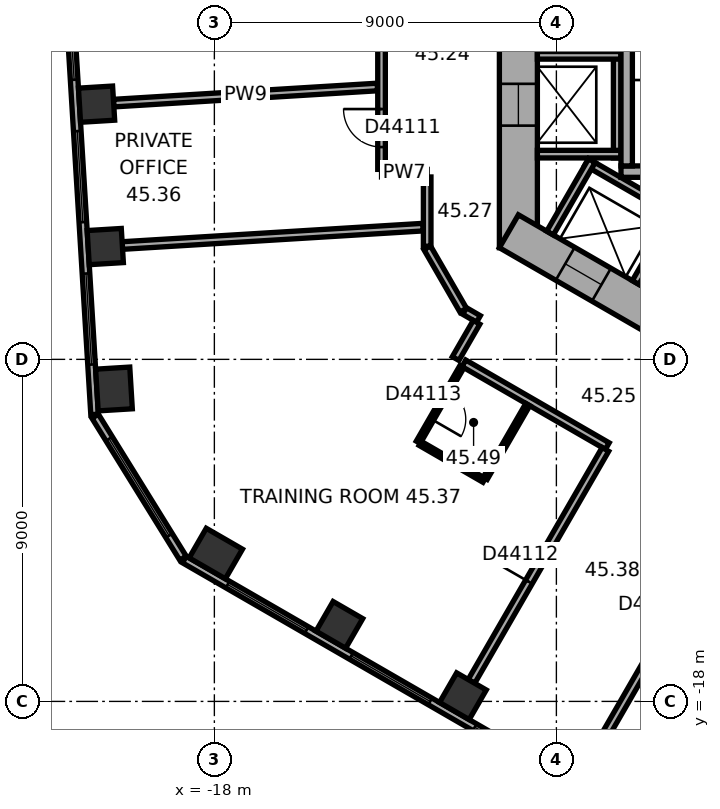
"""IFC4 building model, lengths in metres.
Left out: names, types, materials, properties, quantities, classifications, styles, units other than length and angle.
Written with IfcOpenShell. Run it as: python <this file> out.ifc"""

import sys

from ifc_helpers import new_model, si_unit, direction, frame, frame_2d, origin, origin_2d, place, context, subcontext, project, spatial, rectangle, extrude, element, fill, save


model = new_model("IFC4")
c1 = context("Model", 3, precision=1e-05, world=origin(), true_north=direction((0.0, 1.0)))
c2 = subcontext(c1, "Body", "Model", "MODEL_VIEW")
j1 = project(units=[si_unit("LENGTHUNIT", "METRE"), si_unit("PLANEANGLEUNIT", "RADIAN")], contexts=[c1])
p1 = place(None, origin())
s1 = spatial("IfcSite", under=j1, at=p1, CompositionType="ELEMENT")
p2 = place(p1, origin())
s2 = spatial("IfcBuilding", under=s1, at=p2, CompositionType="ELEMENT")
p3 = place(p2, frame((0.0, 0.0, 183.6)))
s3 = spatial("IfcBuildingStorey", under=s2, at=p3, CompositionType="ELEMENT", Elevation=183.6)
for number, where, z_axis, x_axis in (
    (1, (-21.1, -2.285, 0.0), (0.0, 0.0, 1.0), (0.061, -0.998, 0.0)),
    (2, (-20.871, -6.032, 0.0), (0.0, 0.0, 1.0), (0.061, -0.998, 0.0)),
):
    element("IfcColumn", number, at=place(p3, frame(where, z_axis=z_axis, x_axis=x_axis)), inside=s3, PredefinedType="COLUMN", context=c2, shape_type="SweptSolid", body=[
        extrude(rectangle(XDim=0.9, YDim=0.9, at=origin_2d()), origin(), (0.0, 0.0, 1.0), 3.7),
    ])
for number, where, z_axis, x_axis in (
    (3, (-20.642, -9.779, 0.0), (0.0, 0.0, 1.0), (0.061, -0.998, 0.0)),
    (4, (-17.962, -14.109, 0.0), (0.0, 0.0, 1.0), (0.866, -0.5, 0.0)),
):
    element("IfcColumn", number, at=place(p3, frame(where, z_axis=z_axis, x_axis=x_axis)), inside=s3, PredefinedType="COLUMN", context=c2, shape_type="SweptSolid", body=[
        extrude(rectangle(XDim=1.1, YDim=0.9, at=origin_2d()), origin(), (0.0, 0.0, 1.0), 3.7),
    ])
for number, where, z_axis, x_axis in (
    (5, (-14.711, -15.986, 0.0), (0.0, 0.0, 1.0), (0.866, -0.5, 0.0)),
    (6, (-11.46, -17.863, 0.0), (0.0, 0.0, 1.0), (0.866, -0.5, 0.0)),
):
    element("IfcColumn", number, at=place(p3, frame(where, z_axis=z_axis, x_axis=x_axis)), inside=s3, PredefinedType="COLUMN", context=c2, shape_type="SweptSolid", body=[
        extrude(rectangle(XDim=0.9, YDim=0.9, at=origin_2d()), origin(), (0.0, 0.0, 1.0), 3.7),
    ])
p4 = place(p3, frame((-10.0, 6.062, 0.0), z_axis=(0.0, 0.0, 1.0), x_axis=(0.0, -1.0, 0.0)))
e7 = element("IfcWall", 7, at=p4, inside=s3, PredefinedType="SHEAR", context=c2, shape_type="SweptSolid", body=[
    extrude(rectangle(XDim=12.125, YDim=1.0, at=frame_2d((6.062, 0.0))), origin(), (0.0, 0.0, 1.0), 3.7),
])
p5 = place(p4, frame((5.212, 0.0, 0.0)))
e8 = element("IfcOpeningElement", 8, at=p5, cuts=e7, PredefinedType="OPENING", context=c2, shape_type="SweptSolid", body=[
    extrude(rectangle(XDim=1.1, YDim=2.1, at=frame_2d((0.55, 1.05))), frame((0.0, 0.51, 0.0), z_axis=(0.0, -1.0, 0.0), x_axis=(1.0, 0.0, 0.0)), (0.0, 0.0, 1.0), 1.02),
])
p6 = place(p4, frame((7.812, 0.0, 0.0)))
e9 = element("IfcOpeningElement", 9, at=p6, cuts=e7, PredefinedType="OPENING", context=c2, shape_type="SweptSolid", body=[
    extrude(rectangle(XDim=1.1, YDim=2.1, at=frame_2d((0.55, 1.05))), frame((0.0, 0.51, 0.0), z_axis=(0.0, -1.0, 0.0), x_axis=(1.0, 0.0, 0.0)), (0.0, 0.0, 1.0), 1.02),
])
p7 = place(p3, frame((-10.25, -5.629, 0.0), z_axis=(0.0, 0.0, 1.0), x_axis=(0.866022616891, -0.50000482701, 0.0)))
e10 = element("IfcWall", 10, at=p7, inside=s3, PredefinedType="SHEAR", context=c2, shape_type="SweptSolid", body=[
    extrude(rectangle(XDim=12.125, YDim=1.0, at=frame_2d((6.062, 0.0))), origin(), (0.0, 0.0, 1.0), 3.7),
])
p8 = place(p7, frame((6.262, 0.0, 0.0)))
e11 = element("IfcOpeningElement", 11, at=p8, cuts=e10, PredefinedType="OPENING", context=c2, shape_type="SweptSolid", body=[
    extrude(rectangle(XDim=1.5, YDim=2.1, at=frame_2d((0.75, 1.05))), frame((0.0, 0.51, 0.0), z_axis=(0.0, -1.0, 0.0), x_axis=(1.0, 0.0, 0.0)), (0.0, 0.0, 1.0), 1.02),
])
p9 = place(p7, frame((1.712, 0.0, 0.0)))
e12 = element("IfcOpeningElement", 12, at=p9, cuts=e10, PredefinedType="OPENING", context=c2, shape_type="SweptSolid", body=[
    extrude(rectangle(XDim=1.1, YDim=2.1, at=frame_2d((0.55, 1.05))), frame((0.0, 0.51, 0.0), z_axis=(0.0, -1.0, 0.0), x_axis=(1.0, 0.0, 0.0)), (0.0, 0.0, 1.0), 1.02),
])
p10 = place(p7, frame((4.312, 0.0, 0.0)))
e13 = element("IfcOpeningElement", 13, at=p10, cuts=e10, PredefinedType="OPENING", context=c2, shape_type="SweptSolid", body=[
    extrude(rectangle(XDim=1.1, YDim=2.1, at=frame_2d((0.55, 1.05))), frame((0.0, 0.51, 0.0), z_axis=(0.0, -1.0, 0.0), x_axis=(1.0, 0.0, 0.0)), (0.0, 0.0, 1.0), 1.02),
])
p11 = place(p3, frame((-22.375, 9.557, 0.0), z_axis=(0.0, 0.0, 1.0), x_axis=(0.061036015339, -0.998135564356, 0.0)))
e14 = element("IfcWall", 14, at=p11, inside=s3, PredefinedType="STANDARD", context=c2, shape_type="SweptSolid", body=[
    extrude(rectangle(XDim=20.044, YDim=0.2, at=frame_2d((10.022, 0.0))), origin(), (0.0, 0.0, 1.0), 3.7),
])
p12 = place(p11, frame((1.313, 0.0, 0.9)))
e15 = element("IfcOpeningElement", 15, at=p12, cuts=e14, PredefinedType="OPENING", context=c2, shape_type="SweptSolid", body=[
    extrude(rectangle(XDim=2.4, YDim=2.0, at=frame_2d((1.2, 1.0))), frame((0.0, 0.11, 0.0), z_axis=(0.0, -1.0, 0.0), x_axis=(1.0, 0.0, 0.0)), (0.0, 0.0, 1.0), 0.22),
])
p13 = place(p11, frame((5.067, 0.0, 0.9)))
e16 = element("IfcOpeningElement", 16, at=p13, cuts=e14, PredefinedType="OPENING", context=c2, shape_type="SweptSolid", body=[
    extrude(rectangle(XDim=2.4, YDim=2.0, at=frame_2d((1.2, 1.0))), frame((0.0, 0.11, 0.0), z_axis=(0.0, -1.0, 0.0), x_axis=(1.0, 0.0, 0.0)), (0.0, 0.0, 1.0), 0.22),
])
p14 = place(p11, frame((8.821, 0.0, 0.9)))
e17 = element("IfcOpeningElement", 17, at=p14, cuts=e14, PredefinedType="OPENING", context=c2, shape_type="SweptSolid", body=[
    extrude(rectangle(XDim=2.4, YDim=2.0, at=frame_2d((1.2, 1.0))), frame((0.0, 0.11, 0.0), z_axis=(0.0, -1.0, 0.0), x_axis=(1.0, 0.0, 0.0)), (0.0, 0.0, 1.0), 0.22),
])
p15 = place(p11, frame((12.575, 0.0, 0.9)))
e18 = element("IfcOpeningElement", 18, at=p15, cuts=e14, PredefinedType="OPENING", context=c2, shape_type="SweptSolid", body=[
    extrude(rectangle(XDim=2.4, YDim=2.0, at=frame_2d((1.2, 1.0))), frame((0.0, 0.11, 0.0), z_axis=(0.0, -1.0, 0.0), x_axis=(1.0, 0.0, 0.0)), (0.0, 0.0, 1.0), 0.22),
])
p16 = place(p11, frame((16.329, 0.0, 0.9)))
e19 = element("IfcOpeningElement", 19, at=p16, cuts=e14, PredefinedType="OPENING", context=c2, shape_type="SweptSolid", body=[
    extrude(rectangle(XDim=2.4, YDim=2.0, at=frame_2d((1.2, 1.0))), frame((0.0, 0.11, 0.0), z_axis=(0.0, -1.0, 0.0), x_axis=(1.0, 0.0, 0.0)), (0.0, 0.0, 1.0), 0.22),
])
p17 = place(p3, frame((-21.137, -10.496, 0.0), z_axis=(0.0, 0.0, 1.0), x_axis=(0.526178661629, -0.850374044786, 0.0)))
e20 = element("IfcWall", 20, at=p17, inside=s3, PredefinedType="STANDARD", context=c2, shape_type="SweptSolid", body=[
    extrude(rectangle(XDim=4.395, YDim=0.2, at=frame_2d((2.197, 0.0))), origin(), (0.0, 0.0, 1.0), 3.7),
])
p18 = place(p17, frame((0.698, 0.0, 0.9)))
e21 = element("IfcOpeningElement", 21, at=p18, cuts=e20, PredefinedType="OPENING", context=c2, shape_type="SweptSolid", body=[
    extrude(rectangle(XDim=3.0, YDim=2.0, at=frame_2d((1.5, 1.0))), frame((0.0, 0.11, 0.0), z_axis=(0.0, -1.0, 0.0), x_axis=(1.0, 0.0, 0.0)), (0.0, 0.0, 1.0), 0.22),
])
p19 = place(p3, frame((-18.789, -14.267, 0.0), z_axis=(0.0, 0.0, 1.0), x_axis=(0.866023315909, -0.500003616288, 0.0)))
e22 = element("IfcWall", 22, at=p19, inside=s3, PredefinedType="STANDARD", context=c2, shape_type="SweptSolid", body=[
    extrude(rectangle(XDim=20.044, YDim=0.2, at=frame_2d((10.022, 0.0))), origin(), (0.0, 0.0, 1.0), 3.7),
])
p20 = place(p19, frame((1.314, 0.0, 0.9)))
e23 = element("IfcOpeningElement", 23, at=p20, cuts=e22, PredefinedType="OPENING", context=c2, shape_type="SweptSolid", body=[
    extrude(rectangle(XDim=2.4, YDim=2.0, at=frame_2d((1.2, 1.0))), frame((0.0, 0.11, 0.0), z_axis=(0.0, -1.0, 0.0), x_axis=(1.0, 0.0, 0.0)), (0.0, 0.0, 1.0), 0.22),
])
p21 = place(p19, frame((5.069, 0.0, 0.9)))
e24 = element("IfcOpeningElement", 24, at=p21, cuts=e22, PredefinedType="OPENING", context=c2, shape_type="SweptSolid", body=[
    extrude(rectangle(XDim=2.4, YDim=2.0, at=frame_2d((1.2, 1.0))), frame((0.0, 0.11, 0.0), z_axis=(0.0, -1.0, 0.0), x_axis=(1.0, 0.0, 0.0)), (0.0, 0.0, 1.0), 0.22),
])
p22 = place(p19, frame((8.823, 0.0, 0.9)))
e25 = element("IfcOpeningElement", 25, at=p22, cuts=e22, PredefinedType="OPENING", context=c2, shape_type="SweptSolid", body=[
    extrude(rectangle(XDim=2.4, YDim=2.0, at=frame_2d((1.2, 1.0))), frame((0.0, 0.11, 0.0), z_axis=(0.0, -1.0, 0.0), x_axis=(1.0, 0.0, 0.0)), (0.0, 0.0, 1.0), 0.22),
])
p23 = place(p19, frame((12.577, 0.0, 0.9)))
e26 = element("IfcOpeningElement", 26, at=p23, cuts=e22, PredefinedType="OPENING", context=c2, shape_type="SweptSolid", body=[
    extrude(rectangle(XDim=2.4, YDim=2.0, at=frame_2d((1.2, 1.0))), frame((0.0, 0.11, 0.0), z_axis=(0.0, -1.0, 0.0), x_axis=(1.0, 0.0, 0.0)), (0.0, 0.0, 1.0), 0.22),
])
p24 = place(p19, frame((16.331, 0.0, 0.9)))
e27 = element("IfcOpeningElement", 27, at=p24, cuts=e22, PredefinedType="OPENING", context=c2, shape_type="SweptSolid", body=[
    extrude(rectangle(XDim=2.4, YDim=2.0, at=frame_2d((1.2, 1.0))), frame((0.0, 0.11, 0.0), z_axis=(0.0, -1.0, 0.0), x_axis=(1.0, 0.0, 0.0)), (0.0, 0.0, 1.0), 0.22),
])
p25 = place(p3, frame((-7.4, 4.3, 0.0), z_axis=(0.0, 0.0, 1.0), x_axis=(0.0, -1.0, 0.0)))
e28 = element("IfcWall", 28, at=p25, inside=s3, PredefinedType="PARTITIONING", context=c2, shape_type="SweptSolid", body=[
    extrude(rectangle(XDim=8.0, YDim=0.2, at=frame_2d((4.0, 0.0))), origin(), (0.0, 0.0, 1.0), 3.42),
])
for number, where, z_axis, x_axis in (
    (29, (-7.3, -1.0, 0.0), (0.0, 0.0, 1.0), (-1.0, 0.0, 0.0)),
    (30, (-7.3, -3.6, 0.0), (0.0, 0.0, 1.0), (-1.0, 0.0, 0.0)),
):
    element("IfcWall", number, at=place(p3, frame(where, z_axis=z_axis, x_axis=x_axis)), inside=s3, PredefinedType="PARTITIONING", context=c2, shape_type="SweptSolid", body=[
        extrude(rectangle(XDim=2.2, YDim=0.2, at=frame_2d((1.1, 0.0))), origin(), (0.0, 0.0, 1.0), 3.42),
    ])
p26 = place(p3, frame((-8.203, -3.809, 0.0), z_axis=(0.0, 0.0, 1.0), x_axis=(0.866028230842, -0.499995103361, 0.0)))
e31 = element("IfcWall", 31, at=p26, inside=s3, PredefinedType="PARTITIONING", context=c2, shape_type="SweptSolid", body=[
    extrude(rectangle(XDim=5.4, YDim=0.2, at=frame_2d((2.7, 0.0))), origin(), (0.0, 0.0, 1.0), 3.42),
])
for number, where, z_axis, x_axis in (
    (32, (-8.067, -3.772, 0.0), (0.0, 0.0, 1.0), (-0.5, -0.866, 0.0)),
    (33, (-5.815, -5.072, 0.0), (0.0, 0.0, 1.0), (-0.5, -0.866, 0.0)),
):
    element("IfcWall", number, at=place(p3, frame(where, z_axis=z_axis, x_axis=x_axis)), inside=s3, PredefinedType="PARTITIONING", context=c2, shape_type="SweptSolid", body=[
        extrude(rectangle(XDim=2.2, YDim=0.2, at=frame_2d((1.1, 0.0))), origin(), (0.0, 0.0, 1.0), 3.42),
    ])
p27 = place(p3, frame((-2.6, -4.06, 0.0), z_axis=(0.0, 0.0, 1.0), x_axis=(-1.0, 0.0, 0.0)))
e34 = element("IfcWall", 34, at=p27, inside=s3, PredefinedType="SHEAR", context=c2, shape_type="SweptSolid", body=[
    extrude(rectangle(XDim=4.7, YDim=0.3, at=frame_2d((2.35, 0.0))), origin(), (0.0, 0.0, 1.0), 3.42),
])
p28 = place(p3, frame((-7.15, 3.15, 0.0), z_axis=(0.0, 0.0, 1.0), x_axis=(0.0, -1.0, 0.0)))
e35 = element("IfcWall", 35, at=p28, inside=s3, PredefinedType="SHEAR", context=c2, shape_type="SweptSolid", body=[
    extrude(rectangle(XDim=7.06, YDim=0.3, at=frame_2d((3.53, 0.0))), origin(), (0.0, 0.0, 1.0), 3.42),
])
p29 = place(p3, frame((-20.651, -2.258, 0.0), z_axis=(0.0, 0.0, 1.0), x_axis=(0.998133960965, 0.061062230286, 0.0)))
e36 = element("IfcWall", 36, at=p29, inside=s3, PredefinedType="PARTITIONING", context=c2, shape_type="SweptSolid", body=[
    extrude(rectangle(XDim=6.953, YDim=0.2, at=frame_2d((3.477, 0.0))), origin(), (0.0, 0.0, 1.0), 3.42),
])
p30 = place(p3, frame((-20.421, -6.005, 0.0), z_axis=(0.0, 0.0, 1.0), x_axis=(0.998134865741, 0.061047438866, 0.0)))
e37 = element("IfcWall", 37, at=p30, inside=s3, PredefinedType="PARTITIONING", context=c2, shape_type="SweptSolid", body=[
    extrude(rectangle(XDim=7.927, YDim=0.2, at=frame_2d((3.963, 0.0))), origin(), (0.0, 0.0, 1.0), 2.87),
])
p31 = place(p3, frame((-13.601, -4.101, 0.0), z_axis=(0.0, 0.0, 1.0), x_axis=(1.0, 0.0, 0.0)))
e38 = element("IfcWall", 38, at=p31, inside=s3, PredefinedType="PARTITIONING", context=c2, shape_type="SweptSolid", body=[
    extrude(rectangle(XDim=1.201, YDim=0.2, at=frame_2d((0.601, 0.0))), origin(), (0.0, 0.0, 1.0), 3.42),
])
p32 = place(p3, frame((-13.601, 2.101, 0.0), z_axis=(0.0, 0.0, 1.0), x_axis=(0.0, -1.0, 0.0)))
e39 = element("IfcWall", 39, at=p32, inside=s3, PredefinedType="PARTITIONING", context=c2, shape_type="SweptSolid", body=[
    extrude(rectangle(XDim=6.102, YDim=0.2, at=frame_2d((3.051, 0.0))), origin(), (0.0, 0.0, 1.0), 3.42),
])
p33 = place(p32, frame((4.515, 0.0, 0.0)))
e40 = element("IfcOpeningElement", 40, at=p33, cuts=e39, PredefinedType="OPENING", context=c2, shape_type="SweptSolid", body=[
    extrude(rectangle(XDim=1.0, YDim=2.1, at=frame_2d((0.5, 1.05))), frame((0.0, 0.11, 0.0), z_axis=(0.0, -1.0, 0.0), x_axis=(1.0, 0.0, 0.0)), (0.0, 0.0, 1.0), 0.22),
])
p34 = place(p3, frame((-12.635, -11.182, 0.0), z_axis=(0.0, 0.0, 1.0), x_axis=(0.499952165731, 0.866053019151, 0.0)))
e41 = element("IfcWall", 41, at=p34, inside=s3, PredefinedType="PARTITIONING", context=c2, shape_type="SweptSolid", body=[
    extrude(rectangle(XDim=2.3, YDim=0.12, at=frame_2d((1.15, 0.0))), origin(), (0.0, 0.0, 1.0), 3.42),
])
p35 = place(p34, frame((0.7, 0.0, 0.0)))
e42 = element("IfcOpeningElement", 42, at=p35, cuts=e41, PredefinedType="OPENING", context=c2, shape_type="SweptSolid", body=[
    extrude(rectangle(XDim=0.9, YDim=2.1, at=frame_2d((0.45, 1.05))), frame((0.0, 0.07, 0.0), z_axis=(0.0, -1.0, 0.0), x_axis=(1.0, 0.0, 0.0)), (0.0, 0.0, 1.0), 0.14),
])
p36 = place(p3, frame((-12.4, -6.062, 0.0), z_axis=(0.0, 0.0, 1.0), x_axis=(0.500022797313, -0.86601224135, 0.0)))
e43 = element("IfcWall", 43, at=p36, inside=s3, PredefinedType="PARTITIONING", context=c2, shape_type="SweptSolid", body=[
    extrude(rectangle(XDim=1.9, YDim=0.2, at=frame_2d((0.95, 0.0))), origin(), (0.0, 0.0, 1.0), 3.42),
])
p37 = place(p3, frame((-12.4, -4.201, 0.0), z_axis=(0.0, 0.0, 1.0), x_axis=(0.0, -1.0, 0.0)))
e44 = element("IfcWall", 44, at=p37, inside=s3, PredefinedType="PARTITIONING", context=c2, shape_type="SweptSolid", body=[
    extrude(rectangle(XDim=1.821, YDim=0.2, at=frame_2d((0.911, 0.0))), origin(), (0.0, 0.0, 1.0), 3.42),
])
p38 = place(p3, frame((-11.435, -9.103, 0.0), z_axis=(0.0, 0.0, 1.0), x_axis=(0.866007399799, -0.500031182522, 0.0)))
e45 = element("IfcWall", 45, at=p38, inside=s3, PredefinedType="PARTITIONING", context=c2, shape_type="SweptSolid", body=[
    extrude(rectangle(XDim=4.358, YDim=0.2, at=frame_2d((2.179, 0.0))), origin(), (0.0, 0.0, 1.0), 3.42),
])
p39 = place(p3, frame((-11.415, -7.728, 0.0), z_axis=(0.0, 0.0, 1.0), x_axis=(0.865915281873, -0.500190688257, 0.0)))
e46 = element("IfcWall", 46, at=p39, inside=s3, PredefinedType="PARTITIONING", context=c2, shape_type="SweptSolid", body=[
    extrude(rectangle(XDim=0.421, YDim=0.2, at=frame_2d((0.21, 0.0))), origin(), (0.0, 0.0, 1.0), 3.42),
])
p40 = place(p3, frame((-11.235, -17.474, 0.0), z_axis=(0.0, 0.0, 1.0), x_axis=(0.500009260695, 0.866020057054, 0.0)))
e47 = element("IfcWall", 47, at=p40, inside=s3, PredefinedType="PARTITIONING", context=c2, shape_type="SweptSolid", body=[
    extrude(rectangle(XDim=7.049, YDim=0.2, at=frame_2d((3.524, 0.0))), origin(), (0.0, 0.0, 1.0), 2.87),
])
p41 = place(p40, frame((3.024, 0.0, 0.0)))
e48 = element("IfcOpeningElement", 48, at=p41, cuts=e47, PredefinedType="OPENING", context=c2, shape_type="SweptSolid", body=[
    extrude(rectangle(XDim=1.0, YDim=2.1, at=frame_2d((0.5, 1.05))), frame((0.0, 0.11, 0.0), z_axis=(0.0, -1.0, 0.0), x_axis=(1.0, 0.0, 0.0)), (0.0, 0.0, 1.0), 0.22),
])
p42 = place(p3, frame((-11.101, -8.025, 0.0), z_axis=(0.0, 0.0, 1.0), x_axis=(-0.500074377092, -0.865982457891, 0.0)))
e49 = element("IfcWall", 49, at=p42, inside=s3, PredefinedType="PARTITIONING", context=c2, shape_type="SweptSolid", body=[
    extrude(rectangle(XDim=1.101, YDim=0.2, at=frame_2d((0.55, 0.0))), origin(), (0.0, 0.0, 1.0), 3.42),
])
p43 = place(p3, frame((-10.903, -12.182, 0.0), z_axis=(0.0, 0.0, 1.0), x_axis=(-0.866011626733, 0.500023861795, 0.0)))
e50 = element("IfcWall", 50, at=p43, inside=s3, PredefinedType="PARTITIONING", context=c2, shape_type="SweptSolid", body=[
    extrude(rectangle(XDim=1.94, YDim=0.12, at=frame_2d((0.97, 0.0))), origin(), (0.0, 0.0, 1.0), 3.42),
])
p44 = place(p3, frame((-9.753, -10.19, 0.0), z_axis=(0.0, 0.0, 1.0), x_axis=(-0.49994888933, -0.866054910533, 0.0)))
e51 = element("IfcWall", 51, at=p44, inside=s3, PredefinedType="PARTITIONING", context=c2, shape_type="SweptSolid", body=[
    extrude(rectangle(XDim=2.24, YDim=0.12, at=frame_2d((1.12, 0.0))), origin(), (0.0, 0.0, 1.0), 3.42),
])
p45 = place(p3, frame((-7.984, -19.351, 0.0), z_axis=(0.0, 0.0, 1.0), x_axis=(0.500010139422, 0.866019549707, 0.0)))
e52 = element("IfcWall", 52, at=p45, inside=s3, PredefinedType="PARTITIONING", context=c2, shape_type="SweptSolid", body=[
    extrude(rectangle(XDim=8.35, YDim=0.2, at=frame_2d((4.175, 0.0))), origin(), (0.0, 0.0, 1.0), 3.42),
])
p46 = place(p45, frame((3.675, 0.0, 0.0)))
e53 = element("IfcOpeningElement", 53, at=p46, cuts=e52, PredefinedType="OPENING", context=c2, shape_type="SweptSolid", body=[
    extrude(rectangle(XDim=1.0, YDim=2.1, at=frame_2d((0.5, 1.05))), frame((0.0, 0.11, 0.0), z_axis=(0.0, -1.0, 0.0), x_axis=(1.0, 0.0, 0.0)), (0.0, 0.0, 1.0), 0.22),
])
p47 = place(p14, origin())
e54 = element("IfcWindow", 54, at=p47, inside=s3, PartitioningType="SINGLE_PANEL", PredefinedType="WINDOW", context=c2, shape_type="SweptSolid", body=[
    extrude(rectangle(XDim=2.4, YDim=2.0, at=frame_2d((1.2, 1.0))), frame((0.0, 0.03, 0.0), z_axis=(0.0, -1.0, 0.0), x_axis=(1.0, 0.0, 0.0)), (0.0, 0.0, 1.0), 0.06),
])
fill(e17, e54)
p48 = place(p15, origin())
e55 = element("IfcWindow", 55, at=p48, inside=s3, PartitioningType="SINGLE_PANEL", PredefinedType="WINDOW", context=c2, shape_type="SweptSolid", body=[
    extrude(rectangle(XDim=2.4, YDim=2.0, at=frame_2d((1.2, 1.0))), frame((0.0, 0.03, 0.0), z_axis=(0.0, -1.0, 0.0), x_axis=(1.0, 0.0, 0.0)), (0.0, 0.0, 1.0), 0.06),
])
fill(e18, e55)
p49 = place(p16, origin())
e56 = element("IfcWindow", 56, at=p49, inside=s3, PartitioningType="SINGLE_PANEL", PredefinedType="WINDOW", context=c2, shape_type="SweptSolid", body=[
    extrude(rectangle(XDim=2.4, YDim=2.0, at=frame_2d((1.2, 1.0))), frame((0.0, 0.03, 0.0), z_axis=(0.0, -1.0, 0.0), x_axis=(1.0, 0.0, 0.0)), (0.0, 0.0, 1.0), 0.06),
])
fill(e19, e56)
p50 = place(p18, origin())
e57 = element("IfcWindow", 57, at=p50, inside=s3, PartitioningType="SINGLE_PANEL", PredefinedType="WINDOW", context=c2, shape_type="SweptSolid", body=[
    extrude(rectangle(XDim=3.0, YDim=2.0, at=frame_2d((1.5, 1.0))), frame((0.0, 0.03, 0.0), z_axis=(0.0, -1.0, 0.0), x_axis=(1.0, 0.0, 0.0)), (0.0, 0.0, 1.0), 0.06),
])
fill(e21, e57)
p51 = place(p20, origin())
e58 = element("IfcWindow", 58, at=p51, inside=s3, PartitioningType="SINGLE_PANEL", PredefinedType="WINDOW", context=c2, shape_type="SweptSolid", body=[
    extrude(rectangle(XDim=2.4, YDim=2.0, at=frame_2d((1.2, 1.0))), frame((0.0, 0.03, 0.0), z_axis=(0.0, -1.0, 0.0), x_axis=(1.0, 0.0, 0.0)), (0.0, 0.0, 1.0), 0.06),
])
fill(e23, e58)
p52 = place(p21, origin())
e59 = element("IfcWindow", 59, at=p52, inside=s3, PartitioningType="SINGLE_PANEL", PredefinedType="WINDOW", context=c2, shape_type="SweptSolid", body=[
    extrude(rectangle(XDim=2.4, YDim=2.0, at=frame_2d((1.2, 1.0))), frame((0.0, 0.03, 0.0), z_axis=(0.0, -1.0, 0.0), x_axis=(1.0, 0.0, 0.0)), (0.0, 0.0, 1.0), 0.06),
])
fill(e24, e59)
p53 = place(p22, origin())
e60 = element("IfcWindow", 60, at=p53, inside=s3, PartitioningType="SINGLE_PANEL", PredefinedType="WINDOW", context=c2, shape_type="SweptSolid", body=[
    extrude(rectangle(XDim=2.4, YDim=2.0, at=frame_2d((1.2, 1.0))), frame((0.0, 0.03, 0.0), z_axis=(0.0, -1.0, 0.0), x_axis=(1.0, 0.0, 0.0)), (0.0, 0.0, 1.0), 0.06),
])
fill(e25, e60)
p54 = place(p6, origin())
e61 = element("IfcDoor", 61, at=p54, inside=s3, OperationType="DOUBLE_DOOR_SLIDING", PredefinedType="DOOR", context=c2, shape_type="SweptSolid", body=[
    extrude(rectangle(XDim=1.1, YDim=2.1, at=frame_2d((0.55, 1.05))), frame((0.0, 0.025, 0.0), z_axis=(0.0, -1.0, 0.0), x_axis=(1.0, 0.0, 0.0)), (0.0, 0.0, 1.0), 0.05),
])
fill(e9, e61)
p55 = place(p9, origin())
e62 = element("IfcDoor", 62, at=p55, inside=s3, OperationType="DOUBLE_DOOR_SLIDING", PredefinedType="DOOR", context=c2, shape_type="SweptSolid", body=[
    extrude(rectangle(XDim=1.1, YDim=2.1, at=frame_2d((0.55, 1.05))), frame((0.0, 0.025, 0.0), z_axis=(0.0, -1.0, 0.0), x_axis=(1.0, 0.0, 0.0)), (0.0, 0.0, 1.0), 0.05),
])
fill(e12, e62)
p56 = place(p33, origin())
e63 = element("IfcDoor", 63, at=p56, inside=s3, OperationType="SINGLE_SWING_LEFT", PredefinedType="DOOR", context=c2, shape_type="SweptSolid", body=[
    extrude(rectangle(XDim=1.0, YDim=2.1, at=frame_2d((0.5, 1.05))), frame((0.0, 0.025, 0.0), z_axis=(0.0, -1.0, 0.0), x_axis=(1.0, 0.0, 0.0)), (0.0, 0.0, 1.0), 0.05),
])
fill(e40, e63)
p57 = place(p41, origin())
e64 = element("IfcDoor", 64, at=p57, inside=s3, OperationType="SINGLE_SWING_LEFT", PredefinedType="DOOR", context=c2, shape_type="SweptSolid", body=[
    extrude(rectangle(XDim=1.0, YDim=2.1, at=frame_2d((0.5, 1.05))), frame((0.0, 0.025, 0.0), z_axis=(0.0, -1.0, 0.0), x_axis=(1.0, 0.0, 0.0)), (0.0, 0.0, 1.0), 0.05),
])
fill(e48, e64)
p58 = place(p35, origin())
e65 = element("IfcDoor", 65, at=p58, inside=s3, OperationType="SINGLE_SWING_LEFT", PredefinedType="DOOR", context=c2, shape_type="SweptSolid", body=[
    extrude(rectangle(XDim=0.9, YDim=2.1, at=frame_2d((0.45, 1.05))), frame((0.0, 0.025, 0.0), z_axis=(0.0, -1.0, 0.0), x_axis=(1.0, 0.0, 0.0)), (0.0, 0.0, 1.0), 0.05),
])
fill(e42, e65)
save(model, sys.argv[1])
